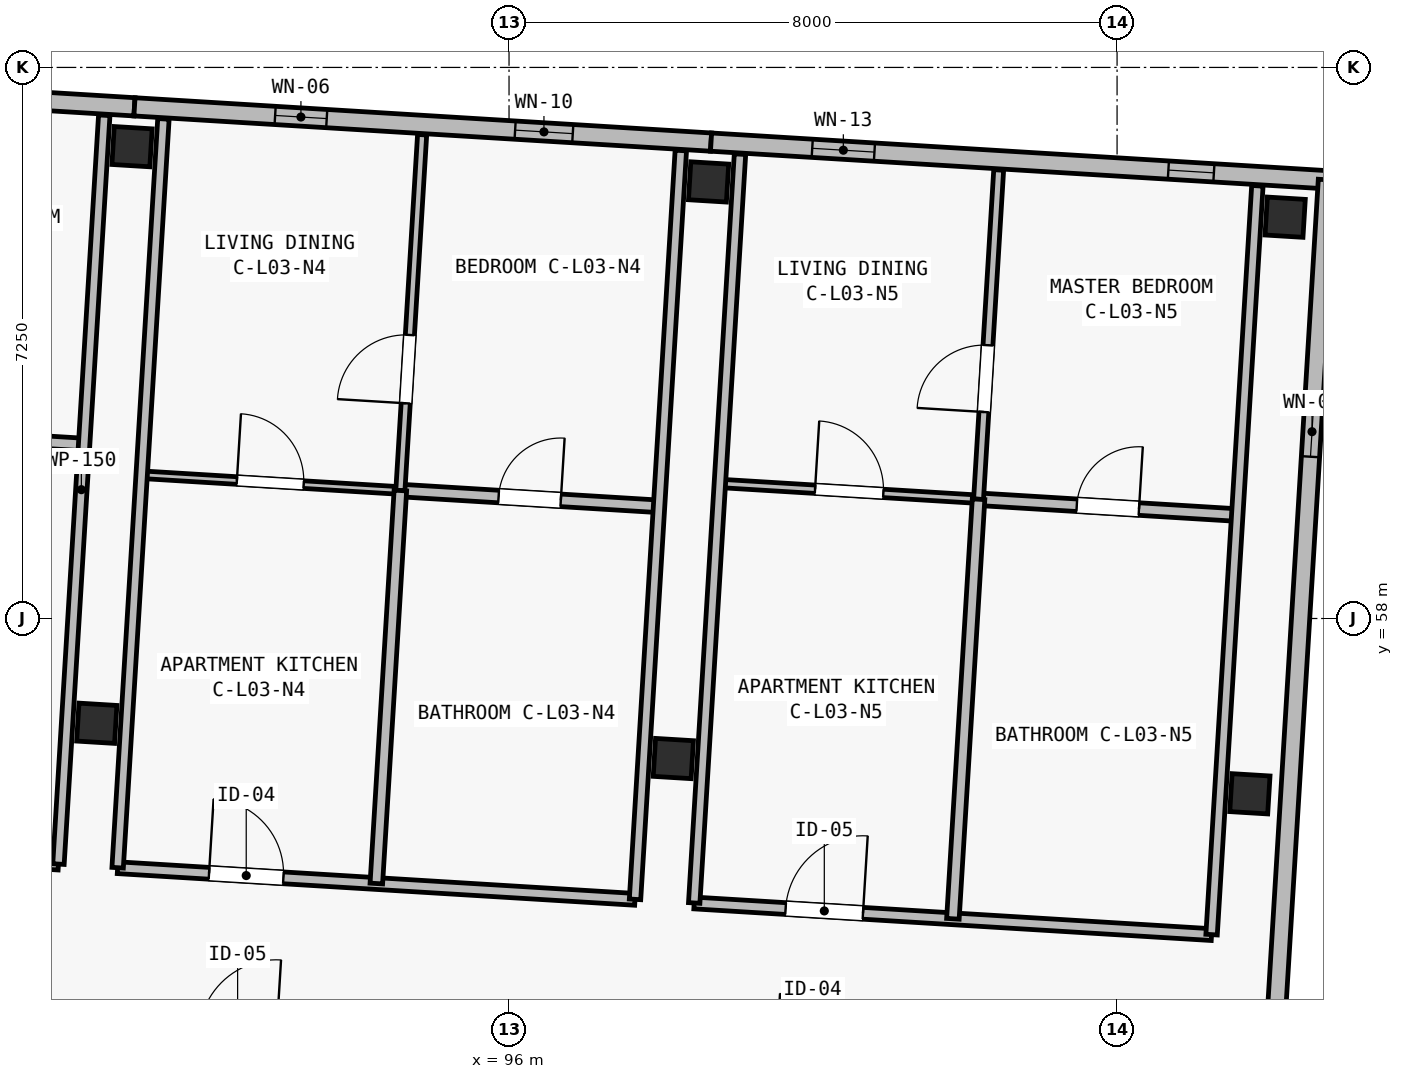
"""IFC4 building model, lengths in metres.
Left out: names, types, materials, properties, quantities, classifications, styles, units other than length and angle.
Written with IfcOpenShell. Run it as: python <this file> out.ifc"""

import sys

from ifc_helpers import new_model, si_unit, direction, frame, frame_2d, origin, origin_2d, place, context, subcontext, project, spatial, rectangle, extrude, element, fill, save


model = new_model("IFC4")
c1 = context("Model", 3, precision=1e-05, world=origin(), true_north=direction((0.0, 1.0)))
c2 = subcontext(c1, "Body", "Model", "MODEL_VIEW")
j1 = project(units=[si_unit("LENGTHUNIT", "METRE"), si_unit("PLANEANGLEUNIT", "RADIAN")], contexts=[c1])
p1 = place(None, origin())
s1 = spatial("IfcSite", under=j1, at=p1, CompositionType="ELEMENT")
p2 = place(p1, origin())
s2 = spatial("IfcBuilding", under=s1, at=p2, CompositionType="ELEMENT")
p3 = place(p2, frame((0.0, 0.0, 11.65)))
s3 = spatial("IfcBuildingStorey", under=s2, at=p3, CompositionType="ELEMENT", Elevation=11.65)
for number, where, z_axis, x_axis in (
    (1, (90.576, 56.622, 0.0), (0.0, 0.0, 1.0), (0.998, -0.061, 0.0)),
    (2, (91.04, 64.208, 0.0), (0.0, 0.0, 1.0), (0.998, -0.061, 0.0)),
    (3, (98.162, 56.158, 0.0), (0.0, 0.0, 1.0), (0.998, -0.061, 0.0)),
    (4, (98.626, 63.744, 0.0), (0.0, 0.0, 1.0), (0.998, -0.061, 0.0)),
    (5, (105.748, 55.694, 0.0), (0.0, 0.0, 1.0), (0.998, -0.061, 0.0)),
    (6, (106.211, 63.28, 0.0), (0.0, 0.0, 1.0), (0.998, -0.061, 0.0)),
):
    element("IfcColumn", number, at=place(p3, frame(where, z_axis=z_axis, x_axis=x_axis)), inside=s3, PredefinedType="COLUMN", context=c2, shape_type="SweptSolid", body=[
        extrude(rectangle(XDim=0.5, YDim=0.5, at=origin_2d()), origin(), (0.0, 0.0, 1.0), 3.25),
    ])
p4 = place(p3, frame((83.486, 65.196, 0.0), z_axis=(0.0, 0.0, 1.0), x_axis=(0.998135669243, -0.061034300063, 0.0)))
e7 = element("IfcWall", 7, at=p4, inside=s3, PredefinedType="SOLIDWALL", context=c2, shape_type="SweptSolid", body=[
    extrude(rectangle(XDim=7.6, YDim=0.24, at=frame_2d((3.8, 0.0))), origin(), (0.0, 0.0, 1.0), 3.0),
])
p5 = place(p4, frame((0.89, 0.0, 0.44)))
e8 = element("IfcOpeningElement", 8, at=p5, cuts=e7, PredefinedType="OPENING", context=c2, shape_type="SweptSolid", body=[
    extrude(rectangle(XDim=0.84, YDim=2.28, at=frame_2d((0.42, 1.14))), frame((0.0, 0.135, 0.0), z_axis=(0.0, -1.0, 0.0), x_axis=(1.0, 0.0, 0.0)), (0.0, 0.0, 1.0), 0.27),
])
p6 = place(p4, frame((5.546, 0.0, 0.5)))
e9 = element("IfcOpeningElement", 9, at=p6, cuts=e7, PredefinedType="OPENING", context=c2, shape_type="SweptSolid", body=[
    extrude(rectangle(XDim=0.62, YDim=2.28, at=frame_2d((0.31, 1.14))), frame((0.0, 0.135, 0.0), z_axis=(0.0, -1.0, 0.0), x_axis=(1.0, 0.0, 0.0)), (0.0, 0.0, 1.0), 0.27),
])
p7 = place(p3, frame((91.072, 64.732, 0.0), z_axis=(0.0, 0.0, 1.0), x_axis=(0.998133591969, -0.061068261669, 0.0)))
e10 = element("IfcWall", 10, at=p7, inside=s3, PredefinedType="SOLIDWALL", context=c2, shape_type="SweptSolid", body=[
    extrude(rectangle(XDim=7.6, YDim=0.24, at=frame_2d((3.8, 0.0))), origin(), (0.0, 0.0, 1.0), 3.0),
])
p8 = place(p7, frame((1.854, 0.0, 0.5)))
e11 = element("IfcOpeningElement", 11, at=p8, cuts=e10, PredefinedType="OPENING", context=c2, shape_type="SweptSolid", body=[
    extrude(rectangle(XDim=0.68, YDim=2.24, at=frame_2d((0.34, 1.12))), frame((0.0, 0.135, 0.0), z_axis=(0.0, -1.0, 0.0), x_axis=(1.0, 0.0, 0.0)), (0.0, 0.0, 1.0), 0.27),
])
p9 = place(p7, frame((5.018, 0.0, 0.44)))
e12 = element("IfcOpeningElement", 12, at=p9, cuts=e10, PredefinedType="OPENING", context=c2, shape_type="SweptSolid", body=[
    extrude(rectangle(XDim=0.76, YDim=2.34, at=frame_2d((0.38, 1.17))), frame((0.0, 0.135, 0.0), z_axis=(0.0, -1.0, 0.0), x_axis=(1.0, 0.0, 0.0)), (0.0, 0.0, 1.0), 0.27),
])
p10 = place(p3, frame((98.658, 64.268, 0.0), z_axis=(0.0, 0.0, 1.0), x_axis=(0.998134248939, -0.061057522844, 0.0)))
e13 = element("IfcWall", 13, at=p10, inside=s3, PredefinedType="SOLIDWALL", context=c2, shape_type="SweptSolid", body=[
    extrude(rectangle(XDim=8.125, YDim=0.24, at=frame_2d((4.062, 0.0))), origin(), (0.0, 0.0, 1.0), 3.0),
])
p11 = place(p10, frame((1.334, 0.0, 0.44)))
e14 = element("IfcOpeningElement", 14, at=p11, cuts=e13, PredefinedType="OPENING", context=c2, shape_type="SweptSolid", body=[
    extrude(rectangle(XDim=0.82, YDim=2.18, at=frame_2d((0.41, 1.09))), frame((0.0, 0.135, 0.0), z_axis=(0.0, -1.0, 0.0), x_axis=(1.0, 0.0, 0.0)), (0.0, 0.0, 1.0), 0.27),
])
p12 = place(p10, frame((6.029, 0.0, 0.5)))
e15 = element("IfcOpeningElement", 15, at=p12, cuts=e13, PredefinedType="OPENING", context=c2, shape_type="SweptSolid", body=[
    extrude(rectangle(XDim=0.6, YDim=2.22, at=frame_2d((0.3, 1.11))), frame((0.0, 0.135, 0.0), z_axis=(0.0, -1.0, 0.0), x_axis=(1.0, 0.0, 0.0)), (0.0, 0.0, 1.0), 0.27),
])
p13 = place(p3, frame((106.768, 63.771, 0.0), z_axis=(0.0, 0.0, 1.0), x_axis=(-0.061053332998, -0.99813450523, 0.0)))
e16 = element("IfcWall", 16, at=p13, inside=s3, PredefinedType="SOLIDWALL", context=c2, shape_type="SweptSolid", body=[
    extrude(rectangle(XDim=20.65, YDim=0.24, at=frame_2d((10.325, 0.0))), origin(), (0.0, 0.0, 1.0), 3.0),
])
p14 = place(p13, frame((2.99, 0.0, 0.52)))
e17 = element("IfcOpeningElement", 17, at=p14, cuts=e16, PredefinedType="OPENING", context=c2, shape_type="SweptSolid", body=[
    extrude(rectangle(XDim=0.66, YDim=2.32, at=frame_2d((0.33, 1.16))), frame((0.0, 0.135, 0.0), z_axis=(0.0, -1.0, 0.0), x_axis=(1.0, 0.0, 0.0)), (0.0, 0.0, 1.0), 0.27),
])
p15 = place(p13, frame((17.22, 0.0, 0.45)))
e18 = element("IfcOpeningElement", 18, at=p15, cuts=e16, PredefinedType="OPENING", context=c2, shape_type="SweptSolid", body=[
    extrude(rectangle(XDim=0.8, YDim=2.3, at=frame_2d((0.4, 1.15))), frame((0.0, 0.135, 0.0), z_axis=(0.0, -1.0, 0.0), x_axis=(1.0, 0.0, 0.0)), (0.0, 0.0, 1.0), 0.27),
])
p16 = place(p3, frame((83.007, 53.097, 0.0), z_axis=(0.0, 0.0, 1.0), x_axis=(0.998135666539, -0.061034344288, 0.0)))
e19 = element("IfcWall", 19, at=p16, inside=s3, PredefinedType="PARTITIONING", context=c2, shape_type="SweptSolid", body=[
    extrude(rectangle(XDim=7.08, YDim=0.155, at=frame_2d((3.54, 0.0))), origin(), (0.0, 0.0, 1.0), 2.97),
])
p17 = place(p16, frame((1.33, 0.0, 0.0)))
e20 = element("IfcOpeningElement", 20, at=p17, cuts=e19, PredefinedType="OPENING", context=c2, shape_type="SweptSolid", body=[
    extrude(rectangle(XDim=0.98, YDim=2.15, at=frame_2d((0.49, 1.075))), frame((0.0, 0.093, 0.0), z_axis=(0.0, -1.0, 0.0), x_axis=(1.0, 0.0, 0.0)), (0.0, 0.0, 1.0), 0.185),
])
p18 = place(p3, frame((83.265, 55.185, 0.0), z_axis=(0.0, 0.0, 1.0), x_axis=(0.998135531673, -0.061036549799, 0.0)))
e21 = element("IfcWall", 21, at=p18, inside=s3, PredefinedType="PARTITIONING", context=c2, shape_type="SweptSolid", body=[
    extrude(rectangle(XDim=6.82, YDim=0.155, at=frame_2d((3.41, 0.0))), origin(), (0.0, 0.0, 1.0), 2.97),
])
p19 = place(p18, frame((1.205, 0.0, 0.0)))
e22 = element("IfcOpeningElement", 22, at=p19, cuts=e21, PredefinedType="OPENING", context=c2, shape_type="SweptSolid", body=[
    extrude(rectangle(XDim=1.02, YDim=2.2, at=frame_2d((0.51, 1.1))), frame((0.0, 0.093, 0.0), z_axis=(0.0, -1.0, 0.0), x_axis=(1.0, 0.0, 0.0)), (0.0, 0.0, 1.0), 0.185),
])
p20 = place(p3, frame((87.006, 60.497, 0.0), z_axis=(0.0, 0.0, 1.0), x_axis=(0.998137711988, -0.061000884486, 0.0)))
e23 = element("IfcWall", 23, at=p20, inside=s3, PredefinedType="PLUMBINGWALL", context=c2, shape_type="SweptSolid", body=[
    extrude(rectangle(XDim=3.41, YDim=0.165, at=frame_2d((1.705, 0.0))), origin(), (0.0, 0.0, 1.0), 2.97),
])
p21 = place(p20, frame((1.295, 0.0, 0.0)))
e24 = element("IfcOpeningElement", 24, at=p21, cuts=e23, PredefinedType="OPENING", context=c2, shape_type="SweptSolid", body=[
    extrude(rectangle(XDim=0.82, YDim=2.08, at=frame_2d((0.41, 1.04))), frame((0.0, 0.097, 0.0), z_axis=(0.0, -1.0, 0.0), x_axis=(1.0, 0.0, 0.0)), (0.0, 0.0, 1.0), 0.195),
])
p22 = place(p3, frame((90.072, 54.769, 0.0), z_axis=(0.0, 0.0, 1.0), x_axis=(0.061047700465, 0.998134849741, 0.0)))
e25 = element("IfcWall", 25, at=p22, inside=s3, PredefinedType="PARTITIONING", context=c2, shape_type="SweptSolid", body=[
    extrude(rectangle(XDim=9.87, YDim=0.15, at=frame_2d((4.935, 0.0))), origin(), (0.0, 0.0, 1.0), 2.97),
])
p23 = place(p3, frame((90.85, 54.721, 0.0), z_axis=(0.0, 0.0, 1.0), x_axis=(0.998135665032, -0.06103436893, 0.0)))
e26 = element("IfcWall", 26, at=p23, inside=s3, PredefinedType="PARTITIONING", context=c2, shape_type="SweptSolid", body=[
    extrude(rectangle(XDim=6.82, YDim=0.155, at=frame_2d((3.41, 0.0))), origin(), (0.0, 0.0, 1.0), 2.97),
])
p24 = place(p23, frame((1.205, 0.0, 0.0)))
e27 = element("IfcOpeningElement", 27, at=p24, cuts=e26, PredefinedType="OPENING", context=c2, shape_type="SweptSolid", body=[
    extrude(rectangle(XDim=0.98, YDim=2.15, at=frame_2d((0.49, 1.075))), frame((0.0, 0.093, 0.0), z_axis=(0.0, -1.0, 0.0), x_axis=(1.0, 0.0, 0.0)), (0.0, 0.0, 1.0), 0.185),
])
p25 = place(p3, frame((91.167, 59.892, 0.0), z_axis=(0.0, 0.0, 1.0), x_axis=(0.998133617109, -0.061067850767, 0.0)))
e28 = element("IfcWall", 28, at=p25, inside=s3, PredefinedType="PARTITIONING", context=c2, shape_type="SweptSolid", body=[
    extrude(rectangle(XDim=3.41, YDim=0.1, at=frame_2d((1.705, 0.0))), origin(), (0.0, 0.0, 1.0), 2.97),
])
p26 = place(p25, frame((1.255, 0.0, 0.0)))
e29 = element("IfcOpeningElement", 29, at=p26, cuts=e28, PredefinedType="OPENING", context=c2, shape_type="SweptSolid", body=[
    extrude(rectangle(XDim=0.88, YDim=2.1, at=frame_2d((0.44, 1.05))), frame((0.0, 0.065, 0.0), z_axis=(0.0, -1.0, 0.0), x_axis=(1.0, 0.0, 0.0)), (0.0, 0.0, 1.0), 0.13),
])
p27 = place(p3, frame((94.57, 59.684, 0.0), z_axis=(0.0, 0.0, 1.0), x_axis=(0.998133350094, -0.061072214879, 0.0)))
e30 = element("IfcWall", 30, at=p27, inside=s3, PredefinedType="PLUMBINGWALL", context=c2, shape_type="SweptSolid", body=[
    extrude(rectangle(XDim=3.41, YDim=0.165, at=frame_2d((1.705, 0.0))), origin(), (0.0, 0.0, 1.0), 2.97),
])
p28 = place(p27, frame((1.295, 0.0, 0.0)))
e31 = element("IfcOpeningElement", 31, at=p28, cuts=e30, PredefinedType="OPENING", context=c2, shape_type="SweptSolid", body=[
    extrude(rectangle(XDim=0.82, YDim=2.08, at=frame_2d((0.41, 1.04))), frame((0.0, 0.097, 0.0), z_axis=(0.0, -1.0, 0.0), x_axis=(1.0, 0.0, 0.0)), (0.0, 0.0, 1.0), 0.195),
])
p29 = place(p3, frame((94.57, 59.684, 0.0), z_axis=(0.0, 0.0, 1.0), x_axis=(0.061062434628, 0.998133948465, 0.0)))
e32 = element("IfcWall", 32, at=p29, inside=s3, PredefinedType="PARTITIONING", context=c2, shape_type="SweptSolid", body=[
    extrude(rectangle(XDim=4.69, YDim=0.12, at=frame_2d((2.345, 0.0))), origin(), (0.0, 0.0, 1.0), 2.97),
])
p30 = place(p29, frame((1.15, 0.0, 0.0)))
e33 = element("IfcOpeningElement", 33, at=p30, cuts=e32, PredefinedType="OPENING", context=c2, shape_type="SweptSolid", body=[
    extrude(rectangle(XDim=0.9, YDim=2.1, at=frame_2d((0.45, 1.05))), frame((0.0, 0.075, 0.0), z_axis=(0.0, -1.0, 0.0), x_axis=(1.0, 0.0, 0.0)), (0.0, 0.0, 1.0), 0.15),
])
p31 = place(p3, frame((94.254, 54.513, 0.0), z_axis=(0.0, 0.0, 1.0), x_axis=(0.061081315517, 0.998132793217, 0.0)))
e34 = element("IfcWall", 34, at=p31, inside=s3, PredefinedType="PLUMBINGWALL", context=c2, shape_type="SweptSolid", body=[
    extrude(rectangle(XDim=5.18, YDim=0.165, at=frame_2d((2.59, 0.0))), origin(), (0.0, 0.0, 1.0), 2.97),
])
for number, where, z_axis, x_axis in (
    (35, (90.85, 54.721, 0.0), (0.0, 0.0, 1.0), (0.061, 0.998, 0.0)),
    (36, (97.658, 54.305, 0.0), (0.0, 0.0, 1.0), (0.061, 0.998, 0.0)),
):
    element("IfcWall", number, at=place(p3, frame(where, z_axis=z_axis, x_axis=x_axis)), inside=s3, PredefinedType="PARTITIONING", context=c2, shape_type="SweptSolid", body=[
        extrude(rectangle(XDim=9.87, YDim=0.15, at=frame_2d((4.935, 0.0))), origin(), (0.0, 0.0, 1.0), 2.97),
    ])
p32 = place(p3, frame((98.436, 54.258, 0.0), z_axis=(0.0, 0.0, 1.0), x_axis=(0.998133350094, -0.061072214879, 0.0)))
e37 = element("IfcWall", 37, at=p32, inside=s3, PredefinedType="PARTITIONING", context=c2, shape_type="SweptSolid", body=[
    extrude(rectangle(XDim=6.82, YDim=0.155, at=frame_2d((3.41, 0.0))), origin(), (0.0, 0.0, 1.0), 2.97),
])
p33 = place(p32, frame((1.205, 0.0, 0.0)))
e38 = element("IfcOpeningElement", 38, at=p33, cuts=e37, PredefinedType="OPENING", context=c2, shape_type="SweptSolid", body=[
    extrude(rectangle(XDim=1.02, YDim=2.2, at=frame_2d((0.51, 1.1))), frame((0.0, 0.093, 0.0), z_axis=(0.0, -1.0, 0.0), x_axis=(1.0, 0.0, 0.0)), (0.0, 0.0, 1.0), 0.185),
])
p34 = place(p3, frame((98.774, 59.777, 0.0), z_axis=(0.0, 0.0, 1.0), x_axis=(0.998137711988, -0.061000884486, 0.0)))
e39 = element("IfcWall", 39, at=p34, inside=s3, PredefinedType="PARTITIONING", context=c2, shape_type="SweptSolid", body=[
    extrude(rectangle(XDim=3.41, YDim=0.11, at=frame_2d((1.705, 0.0))), origin(), (0.0, 0.0, 1.0), 2.97),
])
p35 = place(p34, frame((1.255, 0.0, 0.0)))
e40 = element("IfcOpeningElement", 40, at=p35, cuts=e39, PredefinedType="OPENING", context=c2, shape_type="SweptSolid", body=[
    extrude(rectangle(XDim=0.9, YDim=2.1, at=frame_2d((0.45, 1.05))), frame((0.0, 0.07, 0.0), z_axis=(0.0, -1.0, 0.0), x_axis=(1.0, 0.0, 0.0)), (0.0, 0.0, 1.0), 0.14),
])
p36 = place(p3, frame((102.177, 59.569, 0.0), z_axis=(0.0, 0.0, 1.0), x_axis=(0.998133350094, -0.061072214879, 0.0)))
e41 = element("IfcWall", 41, at=p36, inside=s3, PredefinedType="PLUMBINGWALL", context=c2, shape_type="SweptSolid", body=[
    extrude(rectangle(XDim=3.41, YDim=0.165, at=frame_2d((1.705, 0.0))), origin(), (0.0, 0.0, 1.0), 2.97),
])
p37 = place(p36, frame((1.295, 0.0, 0.0)))
e42 = element("IfcOpeningElement", 42, at=p37, cuts=e41, PredefinedType="OPENING", context=c2, shape_type="SweptSolid", body=[
    extrude(rectangle(XDim=0.82, YDim=2.08, at=frame_2d((0.41, 1.04))), frame((0.0, 0.097, 0.0), z_axis=(0.0, -1.0, 0.0), x_axis=(1.0, 0.0, 0.0)), (0.0, 0.0, 1.0), 0.195),
])
p38 = place(p3, frame((102.177, 59.569, 0.0), z_axis=(0.0, 0.0, 1.0), x_axis=(0.061036861365, 0.998135512621, 0.0)))
e43 = element("IfcWall", 43, at=p38, inside=s3, PredefinedType="PARTITIONING", context=c2, shape_type="SweptSolid", body=[
    extrude(rectangle(XDim=4.34, YDim=0.13, at=frame_2d((2.17, 0.0))), origin(), (0.0, 0.0, 1.0), 2.97),
])
p39 = place(p38, frame((1.15, 0.0, 0.0)))
e44 = element("IfcOpeningElement", 44, at=p39, cuts=e43, PredefinedType="OPENING", context=c2, shape_type="SweptSolid", body=[
    extrude(rectangle(XDim=0.88, YDim=2.1, at=frame_2d((0.44, 1.05))), frame((0.0, 0.08, 0.0), z_axis=(0.0, -1.0, 0.0), x_axis=(1.0, 0.0, 0.0)), (0.0, 0.0, 1.0), 0.16),
])
p40 = place(p3, frame((101.84, 54.049, 0.0), z_axis=(0.0, 0.0, 1.0), x_axis=(0.061056206715, 0.998134329447, 0.0)))
e45 = element("IfcWall", 45, at=p40, inside=s3, PredefinedType="PLUMBINGWALL", context=c2, shape_type="SweptSolid", body=[
    extrude(rectangle(XDim=5.53, YDim=0.165, at=frame_2d((2.765, 0.0))), origin(), (0.0, 0.0, 1.0), 2.97),
])
for number, where, z_axis, x_axis in (
    (46, (98.436, 54.258, 0.0), (0.0, 0.0, 1.0), (0.061, 0.998, 0.0)),
    (47, (105.243, 53.841, 0.0), (0.0, 0.0, 1.0), (0.061, 0.998, 0.0)),
):
    element("IfcWall", number, at=place(p3, frame(where, z_axis=z_axis, x_axis=x_axis)), inside=s3, PredefinedType="PARTITIONING", context=c2, shape_type="SweptSolid", body=[
        extrude(rectangle(XDim=9.87, YDim=0.15, at=frame_2d((4.935, 0.0))), origin(), (0.0, 0.0, 1.0), 2.97),
    ])
p41 = place(p8, origin())
e48 = element("IfcWindow", 48, at=p41, inside=s3, PartitioningType="SINGLE_PANEL", PredefinedType="WINDOW", context=c2, shape_type="SweptSolid", body=[
    extrude(rectangle(XDim=0.68, YDim=2.24, at=frame_2d((0.34, 1.12))), frame((0.0, 0.03, 0.0), z_axis=(0.0, -1.0, 0.0), x_axis=(1.0, 0.0, 0.0)), (0.0, 0.0, 1.0), 0.06),
])
fill(e11, e48)
p42 = place(p9, origin())
e49 = element("IfcWindow", 49, at=p42, inside=s3, PartitioningType="SINGLE_PANEL", PredefinedType="WINDOW", context=c2, shape_type="SweptSolid", body=[
    extrude(rectangle(XDim=0.76, YDim=2.34, at=frame_2d((0.38, 1.17))), frame((0.0, 0.03, 0.0), z_axis=(0.0, -1.0, 0.0), x_axis=(1.0, 0.0, 0.0)), (0.0, 0.0, 1.0), 0.06),
])
fill(e12, e49)
p43 = place(p11, origin())
e50 = element("IfcWindow", 50, at=p43, inside=s3, PartitioningType="SINGLE_PANEL", PredefinedType="WINDOW", context=c2, shape_type="SweptSolid", body=[
    extrude(rectangle(XDim=0.82, YDim=2.18, at=frame_2d((0.41, 1.09))), frame((0.0, 0.03, 0.0), z_axis=(0.0, -1.0, 0.0), x_axis=(1.0, 0.0, 0.0)), (0.0, 0.0, 1.0), 0.06),
])
fill(e14, e50)
p44 = place(p12, origin())
e51 = element("IfcWindow", 51, at=p44, inside=s3, PartitioningType="SINGLE_PANEL", PredefinedType="WINDOW", context=c2, shape_type="SweptSolid", body=[
    extrude(rectangle(XDim=0.6, YDim=2.22, at=frame_2d((0.3, 1.11))), frame((0.0, 0.03, 0.0), z_axis=(0.0, -1.0, 0.0), x_axis=(1.0, 0.0, 0.0)), (0.0, 0.0, 1.0), 0.06),
])
fill(e15, e51)
p45 = place(p14, origin())
e52 = element("IfcWindow", 52, at=p45, inside=s3, PartitioningType="SINGLE_PANEL", PredefinedType="WINDOW", context=c2, shape_type="SweptSolid", body=[
    extrude(rectangle(XDim=0.66, YDim=2.32, at=frame_2d((0.33, 1.16))), frame((0.0, 0.03, 0.0), z_axis=(0.0, -1.0, 0.0), x_axis=(1.0, 0.0, 0.0)), (0.0, 0.0, 1.0), 0.06),
])
fill(e17, e52)
p46 = place(p24, origin())
e53 = element("IfcDoor", 53, at=p46, inside=s3, OperationType="SINGLE_SWING_LEFT", PredefinedType="DOOR", context=c2, shape_type="SweptSolid", body=[
    extrude(rectangle(XDim=0.98, YDim=2.15, at=frame_2d((0.49, 1.075))), frame((0.0, 0.025, 0.0), z_axis=(0.0, -1.0, 0.0), x_axis=(1.0, 0.0, 0.0)), (0.0, 0.0, 1.0), 0.05),
])
fill(e27, e53)
p47 = place(p26, origin())
e54 = element("IfcDoor", 54, at=p47, inside=s3, OperationType="SINGLE_SWING_LEFT", PredefinedType="DOOR", context=c2, shape_type="SweptSolid", body=[
    extrude(rectangle(XDim=0.88, YDim=2.1, at=frame_2d((0.44, 1.05))), frame((0.0, 0.025, 0.0), z_axis=(0.0, -1.0, 0.0), x_axis=(1.0, 0.0, 0.0)), (0.0, 0.0, 1.0), 0.05),
])
fill(e29, e54)
p48 = place(p28, origin())
e55 = element("IfcDoor", 55, at=p48, inside=s3, OperationType="SINGLE_SWING_RIGHT", PredefinedType="DOOR", context=c2, shape_type="SweptSolid", body=[
    extrude(rectangle(XDim=0.82, YDim=2.08, at=frame_2d((0.41, 1.04))), frame((0.0, 0.025, 0.0), z_axis=(0.0, -1.0, 0.0), x_axis=(1.0, 0.0, 0.0)), (0.0, 0.0, 1.0), 0.05),
])
fill(e31, e55)
p49 = place(p30, origin())
e56 = element("IfcDoor", 56, at=p49, inside=s3, OperationType="SINGLE_SWING_LEFT", PredefinedType="DOOR", context=c2, shape_type="SweptSolid", body=[
    extrude(rectangle(XDim=0.9, YDim=2.1, at=frame_2d((0.45, 1.05))), frame((0.0, 0.025, 0.0), z_axis=(0.0, -1.0, 0.0), x_axis=(1.0, 0.0, 0.0)), (0.0, 0.0, 1.0), 0.05),
])
fill(e33, e56)
p50 = place(p33, origin())
e57 = element("IfcDoor", 57, at=p50, inside=s3, OperationType="SINGLE_SWING_RIGHT", PredefinedType="DOOR", context=c2, shape_type="SweptSolid", body=[
    extrude(rectangle(XDim=1.02, YDim=2.2, at=frame_2d((0.51, 1.1))), frame((0.0, 0.025, 0.0), z_axis=(0.0, -1.0, 0.0), x_axis=(1.0, 0.0, 0.0)), (0.0, 0.0, 1.0), 0.05),
])
fill(e38, e57)
p51 = place(p35, origin())
e58 = element("IfcDoor", 58, at=p51, inside=s3, OperationType="SINGLE_SWING_LEFT", PredefinedType="DOOR", context=c2, shape_type="SweptSolid", body=[
    extrude(rectangle(XDim=0.9, YDim=2.1, at=frame_2d((0.45, 1.05))), frame((0.0, 0.025, 0.0), z_axis=(0.0, -1.0, 0.0), x_axis=(1.0, 0.0, 0.0)), (0.0, 0.0, 1.0), 0.05),
])
fill(e40, e58)
p52 = place(p37, origin())
e59 = element("IfcDoor", 59, at=p52, inside=s3, OperationType="SINGLE_SWING_RIGHT", PredefinedType="DOOR", context=c2, shape_type="SweptSolid", body=[
    extrude(rectangle(XDim=0.82, YDim=2.08, at=frame_2d((0.41, 1.04))), frame((0.0, 0.025, 0.0), z_axis=(0.0, -1.0, 0.0), x_axis=(1.0, 0.0, 0.0)), (0.0, 0.0, 1.0), 0.05),
])
fill(e42, e59)
p53 = place(p39, origin())
e60 = element("IfcDoor", 60, at=p53, inside=s3, OperationType="SINGLE_SWING_LEFT", PredefinedType="DOOR", context=c2, shape_type="SweptSolid", body=[
    extrude(rectangle(XDim=0.88, YDim=2.1, at=frame_2d((0.44, 1.05))), frame((0.0, 0.025, 0.0), z_axis=(0.0, -1.0, 0.0), x_axis=(1.0, 0.0, 0.0)), (0.0, 0.0, 1.0), 0.05),
])
fill(e44, e60)
save(model, sys.argv[1])
